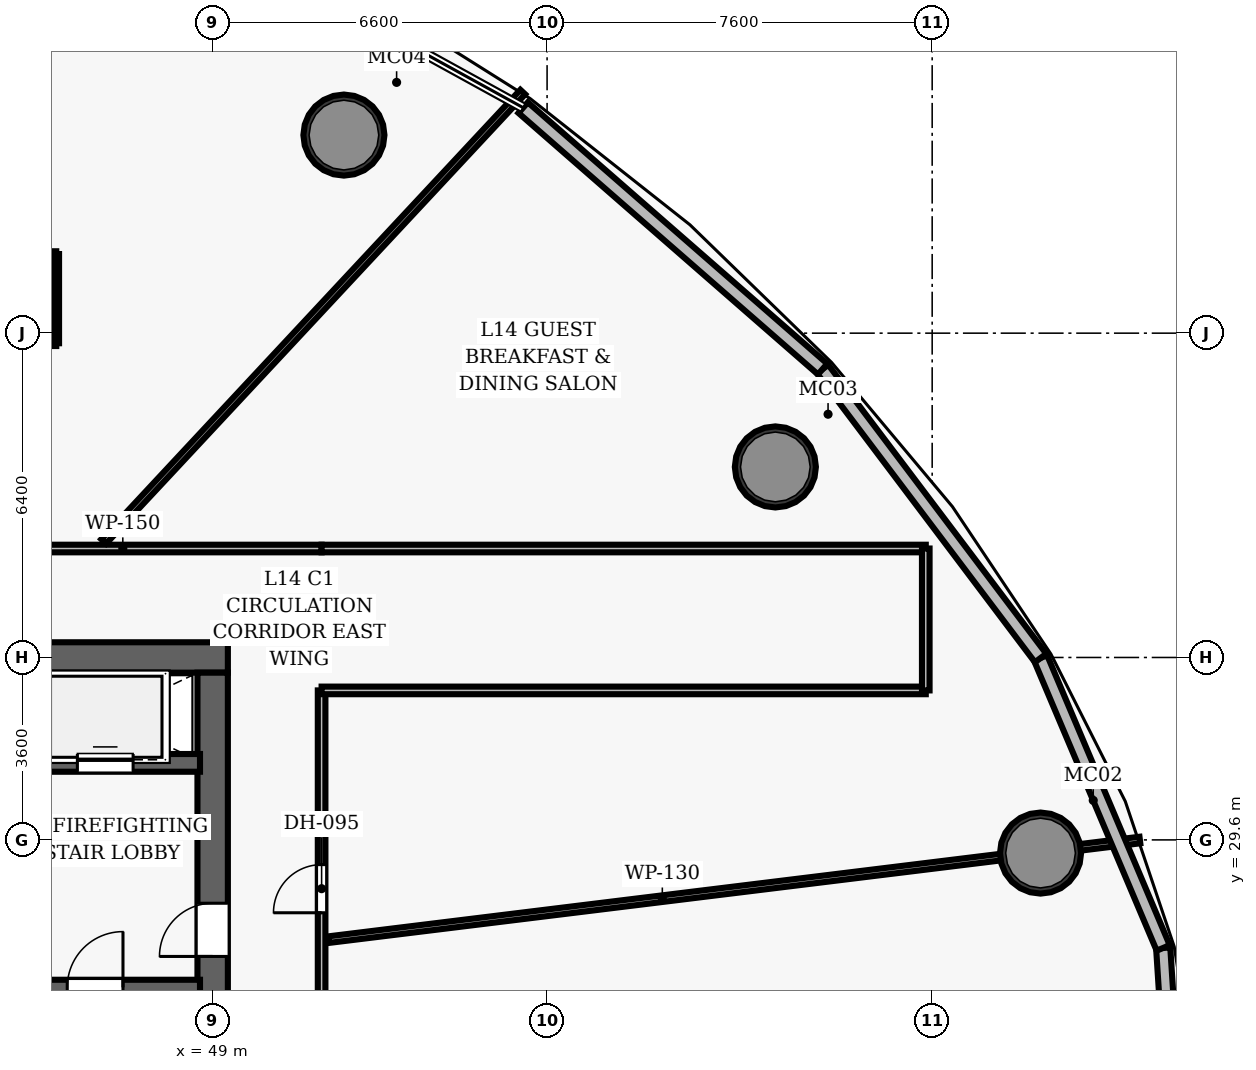
"""IFC4 building model, lengths in metres.
Left out: names, types, materials, properties, quantities, classifications, styles, units other than length and angle.
Written with IfcOpenShell. Run it as: python <this file> out.ifc"""

import sys

from ifc_helpers import new_model, si_unit, direction, frame, frame_2d, origin, origin_2d, place, context, subcontext, project, spatial, rectangle, hollow_circle, extrude, element, fill, save


model = new_model("IFC4")
c1 = context("Model", 3, precision=1e-05, world=origin(), true_north=direction((0.0, 1.0)))
c2 = subcontext(c1, "Body", "Model", "MODEL_VIEW")
j1 = project(units=[si_unit("LENGTHUNIT", "METRE"), si_unit("PLANEANGLEUNIT", "RADIAN")], contexts=[c1])
p1 = place(None, origin())
s1 = spatial("IfcSite", under=j1, at=p1, CompositionType="ELEMENT")
p2 = place(p1, origin())
s2 = spatial("IfcBuilding", under=s1, at=p2, CompositionType="ELEMENT")
p3 = place(p2, frame((0.0, 0.0, 65.9)))
s3 = spatial("IfcBuildingStorey", under=s2, at=p3, CompositionType="ELEMENT", Elevation=65.9)
p4 = place(p3, frame((26.7, 33.2, 0.0), z_axis=(0.0, 0.0, 1.0), x_axis=(1.0, 0.0, 0.0)))
e1 = element("IfcWall", 1, at=p4, inside=s3, PredefinedType="SHEAR", context=c2, shape_type="SweptSolid", body=[
    extrude(rectangle(XDim=22.6, YDim=0.6, at=frame_2d((11.3, 0.0))), origin(), (0.0, 0.0, 1.0), 3.5),
])
p5 = place(p4, frame((4.62, 0.0, 0.0)))
e2 = element("IfcOpeningElement", 2, at=p5, cuts=e1, PredefinedType="OPENING", context=c2, shape_type="SweptSolid", body=[
    extrude(rectangle(XDim=1.05, YDim=2.15, at=frame_2d((0.525, 1.075))), frame((0.0, 0.31, 0.0), z_axis=(0.0, -1.0, 0.0), x_axis=(1.0, 0.0, 0.0)), (0.0, 0.0, 1.0), 0.62),
])
p6 = place(p4, frame((14.52, 0.0, 0.0)))
e3 = element("IfcOpeningElement", 3, at=p6, cuts=e1, PredefinedType="OPENING", context=c2, shape_type="SweptSolid", body=[
    extrude(rectangle(XDim=1.05, YDim=2.15, at=frame_2d((0.525, 1.075))), frame((0.0, 0.31, 0.0), z_axis=(0.0, -1.0, 0.0), x_axis=(1.0, 0.0, 0.0)), (0.0, 0.0, 1.0), 0.62),
])
p7 = place(p3, frame((49.0, 19.1, 0.0), z_axis=(0.0, 0.0, 1.0), x_axis=(0.0, 1.0, 0.0)))
e4 = element("IfcWall", 4, at=p7, inside=s3, PredefinedType="SHEAR", context=c2, shape_type="SweptSolid", body=[
    extrude(rectangle(XDim=13.8, YDim=0.6, at=frame_2d((6.9, 0.0))), origin(), (0.0, 0.0, 1.0), 3.5),
])
p8 = place(p7, frame((8.2, 0.0, 0.0)))
e5 = element("IfcOpeningElement", 5, at=p8, cuts=e4, PredefinedType="OPENING", context=c2, shape_type="SweptSolid", body=[
    extrude(rectangle(XDim=1.05, YDim=2.15, at=frame_2d((0.525, 1.075))), frame((0.0, 0.31, 0.0), z_axis=(0.0, -1.0, 0.0), x_axis=(1.0, 0.0, 0.0)), (0.0, 0.0, 1.0), 0.62),
])
for number, where, z_axis, x_axis in (
    (6, (65.339, 29.34, 0.0), (0.0, 0.0, 1.0), (1.0, 0.0, 0.0)),
    (7, (60.105, 36.96, 0.0), (0.0, 0.0, 1.0), (1.0, 0.0, 0.0)),
    (8, (51.59, 43.509, 0.0), (0.0, 0.0, 1.0), (1.0, 0.0, 0.0)),
):
    element("IfcColumn", number, at=place(p3, frame(where, z_axis=z_axis, x_axis=x_axis)), inside=s3, PredefinedType="COLUMN", context=c2, shape_type="SweptSolid", body=[
        extrude(hollow_circle(Radius=0.8, WallThickness=0.06, at=origin_2d()), origin(), (0.0, 0.0, 1.0), 3.5),
    ])
p9 = place(p3, frame((45.08, 26.69, 0.0), z_axis=(0.0, 0.0, 1.0), x_axis=(1.0, 0.0, 0.0)))
e9 = element("IfcWall", 9, at=p9, inside=s3, PredefinedType="SHEAR", context=c2, shape_type="SweptSolid", body=[
    extrude(rectangle(XDim=3.67, YDim=0.3, at=frame_2d((1.835, 0.0))), origin(), (0.0, 0.0, 1.0), 3.5),
])
p10 = place(p9, frame((1.05, 0.0, 0.0)))
e10 = element("IfcOpeningElement", 10, at=p10, cuts=e9, PredefinedType="OPENING", context=c2, shape_type="SweptSolid", body=[
    extrude(rectangle(XDim=1.1, YDim=2.15, at=frame_2d((0.55, 1.075))), frame((0.0, 0.16, 0.0), z_axis=(0.0, -1.0, 0.0), x_axis=(1.0, 0.0, 0.0)), (0.0, 0.0, 1.0), 0.32),
])
p11 = place(p3, frame((45.08, 31.12, 0.0), z_axis=(0.0, 0.0, 1.0), x_axis=(1.0, 0.0, 0.0)))
e11 = element("IfcWall", 11, at=p11, inside=s3, PredefinedType="SHEAR", context=c2, shape_type="SweptSolid", body=[
    extrude(rectangle(XDim=3.67, YDim=0.35, at=frame_2d((1.835, 0.0))), origin(), (0.0, 0.0, 1.0), 2.6),
])
p12 = place(p11, frame((1.25, 0.0, 0.0)))
e12 = element("IfcOpeningElement", 12, at=p12, cuts=e11, PredefinedType="OPENING", context=c2, shape_type="SweptSolid", body=[
    extrude(rectangle(XDim=1.1, YDim=2.15, at=frame_2d((0.55, 1.075))), frame((0.0, 0.185, 0.0), z_axis=(0.0, -1.0, 0.0), x_axis=(1.0, 0.0, 0.0)), (0.0, 0.0, 1.0), 0.37),
])
p13 = place(p3, frame((27.65, 35.35, 0.0), z_axis=(0.0, 0.0, 1.0), x_axis=(1.0, 0.0, 0.0)))
e13 = element("IfcWall", 13, at=p13, inside=s3, PredefinedType="PARTITIONING", context=c2, shape_type="SweptSolid", body=[
    extrude(rectangle(XDim=23.5, YDim=0.15, at=frame_2d((11.75, 0.0))), origin(), (0.0, 0.0, 1.0), 2.6),
])
p14 = place(p13, frame((14.553, 0.0, 0.0)))
e14 = element("IfcOpeningElement", 14, at=p14, cuts=e13, PredefinedType="OPENING", context=c2, shape_type="SweptSolid", body=[
    extrude(rectangle(XDim=0.95, YDim=2.15, at=frame_2d((0.475, 1.075))), frame((0.0, 0.085, 0.0), z_axis=(0.0, -1.0, 0.0), x_axis=(1.0, 0.0, 0.0)), (0.0, 0.0, 1.0), 0.17),
])
p15 = place(p13, frame((7.784, 0.0, 0.0)))
e15 = element("IfcOpeningElement", 15, at=p15, cuts=e13, PredefinedType="OPENING", context=c2, shape_type="SweptSolid", body=[
    extrude(rectangle(XDim=0.95, YDim=2.15, at=frame_2d((0.475, 1.075))), frame((0.0, 0.085, 0.0), z_axis=(0.0, -1.0, 0.0), x_axis=(1.0, 0.0, 0.0)), (0.0, 0.0, 1.0), 0.17),
])
p16 = place(p3, frame((51.15, 16.65, 0.0), z_axis=(0.0, 0.0, 1.0), x_axis=(0.0, 1.0, 0.0)))
e16 = element("IfcWall", 16, at=p16, inside=s3, PredefinedType="PARTITIONING", context=c2, shape_type="SweptSolid", body=[
    extrude(rectangle(XDim=15.9, YDim=0.15, at=frame_2d((7.95, 0.0))), origin(), (0.0, 0.0, 1.0), 2.6),
])
p17 = place(p16, frame((11.512, 0.0, 0.0)))
e17 = element("IfcOpeningElement", 17, at=p17, cuts=e16, PredefinedType="OPENING", context=c2, shape_type="SweptSolid", body=[
    extrude(rectangle(XDim=0.95, YDim=2.15, at=frame_2d((0.475, 1.075))), frame((0.0, 0.085, 0.0), z_axis=(0.0, -1.0, 0.0), x_axis=(1.0, 0.0, 0.0)), (0.0, 0.0, 1.0), 0.17),
])
p18 = place(p16, frame((7.004, 0.0, 0.0)))
e18 = element("IfcOpeningElement", 18, at=p18, cuts=e16, PredefinedType="OPENING", context=c2, shape_type="SweptSolid", body=[
    extrude(rectangle(XDim=0.95, YDim=2.15, at=frame_2d((0.475, 1.075))), frame((0.0, 0.085, 0.0), z_axis=(0.0, -1.0, 0.0), x_axis=(1.0, 0.0, 0.0)), (0.0, 0.0, 1.0), 0.17),
])
for number, where, z_axis, x_axis in (
    (19, (51.15, 35.35, 0.0), (0.0, 0.0, 1.0), (1.0, 0.0, 0.0)),
    (20, (51.15, 32.55, 0.0), (0.0, 0.0, 1.0), (1.0, 0.0, 0.0)),
):
    element("IfcWall", number, at=place(p3, frame(where, z_axis=z_axis, x_axis=x_axis)), inside=s3, PredefinedType="PARTITIONING", context=c2, shape_type="SweptSolid", body=[
        extrude(rectangle(XDim=11.924, YDim=0.15, at=frame_2d((5.962, 0.0))), origin(), (0.0, 0.0, 1.0), 2.6),
    ])
p19 = place(p3, frame((63.073, 32.55, 0.0), z_axis=(0.0, 0.0, 1.0), x_axis=(0.0, 1.0, 0.0)))
e21 = element("IfcWall", 21, at=p19, inside=s3, PredefinedType="PARTITIONING", context=c2, shape_type="SweptSolid", body=[
    extrude(rectangle(XDim=2.8, YDim=0.15, at=frame_2d((1.4, 0.0))), origin(), (0.0, 0.0, 1.0), 2.6),
])
p20 = place(p3, frame((51.29, 27.632, 0.0), z_axis=(0.0, 0.0, 1.0), x_axis=(0.992547020921, 0.12186226348, 0.0)))
e22 = element("IfcWall", 22, at=p20, inside=s3, PredefinedType="PARTITIONING", context=c2, shape_type="SweptSolid", body=[
    extrude(rectangle(XDim=16.129, YDim=0.13, at=frame_2d((8.065, 0.0))), origin(), (0.0, 0.0, 1.0), 2.6),
])
p21 = place(p3, frame((46.85, 35.49, 0.0), z_axis=(0.0, 0.0, 1.0), x_axis=(0.681992512367, 0.731359154639, 0.0)))
e23 = element("IfcWall", 23, at=p21, inside=s3, PredefinedType="PARTITIONING", context=c2, shape_type="SweptSolid", body=[
    extrude(rectangle(XDim=12.126, YDim=0.13, at=frame_2d((6.063, 0.0))), origin(), (0.0, 0.0, 1.0), 2.6),
])
p22 = place(p3, frame((43.713, 39.401, 0.0), z_axis=(0.0, 0.0, 1.0), x_axis=(1.0, 0.0, 0.0)))
e24 = element("IfcWall", 24, at=p22, inside=s3, PredefinedType="PARTITIONING", context=c2, shape_type="SweptSolid", body=[
    extrude(rectangle(XDim=2.2, YDim=0.11, at=frame_2d((1.1, 0.0))), origin(), (0.0, 0.0, 1.0), 2.6),
])
p23 = place(p3, frame((43.713, 41.161, 0.0), z_axis=(0.0, 0.0, 1.0), x_axis=(1.0, 0.0, 0.0)))
e25 = element("IfcWall", 25, at=p23, inside=s3, PredefinedType="PARTITIONING", context=c2, shape_type="SweptSolid", body=[
    extrude(rectangle(XDim=2.2, YDim=0.11, at=frame_2d((1.1, 0.0))), origin(), (0.0, 0.0, 1.0), 2.6),
])
p24 = place(p23, frame((0.68, 0.0, 0.0)))
e26 = element("IfcOpeningElement", 26, at=p24, cuts=e25, PredefinedType="OPENING", context=c2, shape_type="SweptSolid", body=[
    extrude(rectangle(XDim=0.85, YDim=2.1, at=frame_2d((0.425, 1.05))), frame((0.0, 0.065, 0.0), z_axis=(0.0, -1.0, 0.0), x_axis=(1.0, 0.0, 0.0)), (0.0, 0.0, 1.0), 0.13),
])
p25 = place(p3, frame((45.913, 39.401, 0.0), z_axis=(0.0, 0.0, 1.0), x_axis=(0.0, 1.0, 0.0)))
e27 = element("IfcWall", 27, at=p25, inside=s3, PredefinedType="PARTITIONING", context=c2, shape_type="SweptSolid", body=[
    extrude(rectangle(XDim=1.76, YDim=0.11, at=frame_2d((0.88, 0.0))), origin(), (0.0, 0.0, 1.0), 2.6),
])
p26 = place(p3, frame((67.76, 27.468, 0.0), z_axis=(0.0, 0.0, 1.0), x_axis=(0.064308089631, -0.997930092546, 0.0)))
e28 = element("IfcWall", 28, at=p26, inside=s3, PredefinedType="SOLIDWALL", context=c2, shape_type="SweptSolid", body=[
    extrude(rectangle(XDim=5.497, YDim=0.28, at=frame_2d((2.749, 0.0))), origin(), (0.0, 0.0, 1.0), 3.25),
])
p27 = place(p3, frame((65.34, 33.19, 0.0), z_axis=(0.0, 0.0, 1.0), x_axis=(0.38946562283, -0.921041002689, 0.0)))
e29 = element("IfcWall", 29, at=p27, inside=s3, PredefinedType="SOLIDWALL", context=c2, shape_type="SweptSolid", body=[
    extrude(rectangle(XDim=6.212, YDim=0.28, at=frame_2d((3.106, 0.0))), origin(), (0.0, 0.0, 1.0), 3.25),
])
p28 = place(p3, frame((61.038, 38.891, 0.0), z_axis=(0.0, 0.0, 1.0), x_axis=(0.602327192547, -0.798249305116, 0.0)))
e30 = element("IfcWall", 30, at=p28, inside=s3, PredefinedType="SOLIDWALL", context=c2, shape_type="SweptSolid", body=[
    extrude(rectangle(XDim=7.143, YDim=0.28, at=frame_2d((3.571, 0.0))), origin(), (0.0, 0.0, 1.0), 3.25),
])
p29 = place(p3, frame((55.128, 44.05, 0.0), z_axis=(0.0, 0.0, 1.0), x_axis=(0.753362705376, -0.657605226673, 0.0)))
e31 = element("IfcWall", 31, at=p29, inside=s3, PredefinedType="SOLIDWALL", context=c2, shape_type="SweptSolid", body=[
    extrude(rectangle(XDim=7.845, YDim=0.28, at=frame_2d((3.922, 0.0))), origin(), (0.0, 0.0, 1.0), 3.25),
])
p30 = place(p10, origin())
e32 = element("IfcDoor", 32, at=p30, inside=s3, OperationType="SINGLE_SWING_RIGHT", PredefinedType="DOOR", context=c2, shape_type="SweptSolid", body=[
    extrude(rectangle(XDim=1.1, YDim=2.15, at=frame_2d((0.55, 1.075))), frame((0.0, 0.025, 0.0), z_axis=(0.0, -1.0, 0.0), x_axis=(1.0, 0.0, 0.0)), (0.0, 0.0, 1.0), 0.05),
])
fill(e10, e32)
p31 = place(p8, origin())
e33 = element("IfcDoor", 33, at=p31, inside=s3, OperationType="SINGLE_SWING_LEFT", PredefinedType="DOOR", context=c2, shape_type="SweptSolid", body=[
    extrude(rectangle(XDim=1.05, YDim=2.15, at=frame_2d((0.525, 1.075))), frame((0.0, 0.025, 0.0), z_axis=(0.0, -1.0, 0.0), x_axis=(1.0, 0.0, 0.0)), (0.0, 0.0, 1.0), 0.05),
])
fill(e5, e33)
p32 = place(p17, origin())
e34 = element("IfcDoor", 34, at=p32, inside=s3, OperationType="SINGLE_SWING_LEFT", PredefinedType="DOOR", context=c2, shape_type="SweptSolid", body=[
    extrude(rectangle(XDim=0.95, YDim=2.15, at=frame_2d((0.475, 1.075))), frame((0.0, 0.025, 0.0), z_axis=(0.0, -1.0, 0.0), x_axis=(1.0, 0.0, 0.0)), (0.0, 0.0, 1.0), 0.05),
])
fill(e17, e34)
p33 = place(p12, origin())
e35 = element("IfcDoor", 35, at=p33, inside=s3, OperationType="SLIDING_TO_LEFT", PredefinedType="DOOR", context=c2, shape_type="SweptSolid", body=[
    extrude(rectangle(XDim=1.1, YDim=2.15, at=frame_2d((0.55, 1.075))), frame((0.0, 0.025, 0.0), z_axis=(0.0, -1.0, 0.0), x_axis=(1.0, 0.0, 0.0)), (0.0, 0.0, 1.0), 0.05),
])
fill(e12, e35)
save(model, sys.argv[1])
